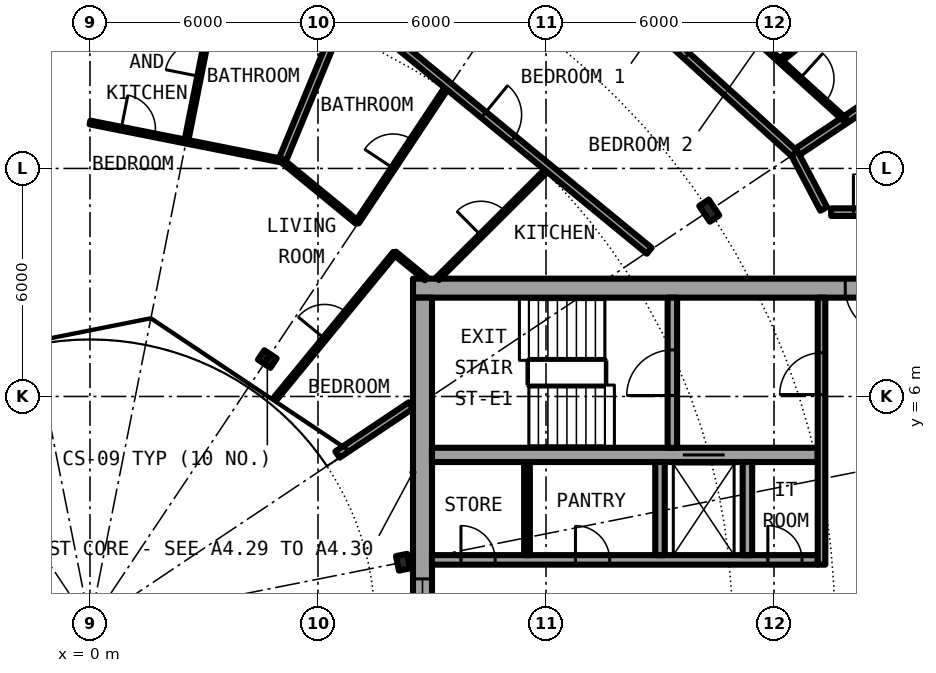
"""IFC4 building model, lengths in metres.
Left out: names, types, materials, properties, quantities, classifications, styles, units other than length and angle.
Written with IfcOpenShell. Run it as: python <this file> out.ifc"""

import sys

from ifc_helpers import new_model, si_unit, direction, frame, frame_2d, origin, origin_2d, place, context, subcontext, project, spatial, rectangle, i_section, extrude, element, fill, save


model = new_model("IFC4")
c1 = context("Model", 3, precision=1e-05, world=origin(), true_north=direction((0.0, 1.0)))
c2 = subcontext(c1, "Body", "Model", "MODEL_VIEW")
j1 = project(units=[si_unit("LENGTHUNIT", "METRE"), si_unit("PLANEANGLEUNIT", "RADIAN")], contexts=[c1])
p1 = place(None, origin())
s1 = spatial("IfcSite", under=j1, at=p1, CompositionType="ELEMENT")
p2 = place(p1, origin())
s2 = spatial("IfcBuilding", under=s1, at=p2, CompositionType="ELEMENT")
p3 = place(p2, frame((0.0, 0.0, 161.6)))
s3 = spatial("IfcBuildingStorey", under=s2, at=p3, CompositionType="ELEMENT", Elevation=161.6)
p4 = place(p3, frame((16.297, 10.889, 0.0), z_axis=(0.0, 0.0, 1.0), x_axis=(0.831469612303, 0.55557023302, 0.0)))
e1 = element("IfcColumn", 1, at=p4, inside=s3, PredefinedType="COLUMN", context=c2, shape_type="SweptSolid", body=[
    extrude(i_section(OverallWidth=0.3, OverallDepth=0.5, WebThickness=0.014, FlangeThickness=0.028, FilletRadius=0.027, at=origin_2d()), origin(), (0.0, 0.0, 1.0), 3.05),
])
for number, where, z_axis, x_axis in (
    (2, (8.239, 1.639, 0.0), (0.0, 0.0, 1.0), (0.981, 0.195, 0.0)),
    (3, (4.667, 6.984, 0.0), (0.0, 0.0, 1.0), (0.556, 0.831, 0.0)),
):
    element("IfcColumn", number, at=place(p3, frame(where, z_axis=z_axis, x_axis=x_axis)), inside=s3, PredefinedType="COLUMN", context=c2, shape_type="SweptSolid", body=[
        extrude(i_section(OverallWidth=0.3, OverallDepth=0.39, WebThickness=0.011, FlangeThickness=0.019, FilletRadius=0.027, at=origin_2d()), origin(), (0.0, 0.0, 1.0), 3.05),
    ])
p5 = place(p3, frame((22.1, 8.85, 0.0), z_axis=(0.0, 0.0, 1.0), x_axis=(-1.0, 0.0, 0.0)))
e4 = element("IfcWall", 4, at=p5, inside=s3, PredefinedType="SHEAR", context=c2, shape_type="SweptSolid", body=[
    extrude(rectangle(XDim=13.6, YDim=0.5, at=frame_2d((6.8, 0.0))), origin(), (0.0, 0.0, 1.0), 3.05),
])
p6 = place(p5, frame((1.025, 0.0, 0.0)))
e5 = element("IfcOpeningElement", 5, at=p6, cuts=e4, PredefinedType="OPENING", context=c2, shape_type="SweptSolid", body=[
    extrude(rectangle(XDim=1.2, YDim=2.3, at=frame_2d((0.6, 1.15))), frame((0.0, 0.26, 0.0), z_axis=(0.0, -1.0, 0.0), x_axis=(1.0, 0.0, 0.0)), (0.0, 0.0, 1.0), 0.52),
])
p7 = place(p3, frame((8.75, -8.6, 0.0), z_axis=(0.0, 0.0, 1.0), x_axis=(0.0, 1.0, 0.0)))
e6 = element("IfcWall", 6, at=p7, inside=s3, PredefinedType="SHEAR", context=c2, shape_type="SweptSolid", body=[
    extrude(rectangle(XDim=17.2, YDim=0.5, at=frame_2d((8.6, 0.0))), origin(), (0.0, 0.0, 1.0), 3.05),
])
p8 = place(p7, frame((7.4, 0.0, 0.1)))
e7 = element("IfcOpeningElement", 7, at=p8, cuts=e6, PredefinedType="OPENING", context=c2, shape_type="SweptSolid", body=[
    extrude(rectangle(XDim=2.4, YDim=2.2, at=frame_2d((1.2, 1.1))), frame((0.0, 0.26, 0.0), z_axis=(0.0, -1.0, 0.0), x_axis=(1.0, 0.0, 0.0)), (0.0, 0.0, 1.0), 0.52),
])
p9 = place(p3, frame((9.0, 1.7, 0.0), z_axis=(0.0, 0.0, 1.0), x_axis=(1.0, 0.0, 0.0)))
e8 = element("IfcWall", 8, at=p9, inside=s3, PredefinedType="SHEAR", context=c2, shape_type="SweptSolid", body=[
    extrude(rectangle(XDim=10.15, YDim=0.25, at=frame_2d((5.075, 0.0))), origin(), (0.0, 0.0, 1.0), 3.05),
])
p10 = place(p9, frame((0.762, 0.0, 0.0)))
e9 = element("IfcOpeningElement", 9, at=p10, cuts=e8, PredefinedType="OPENING", context=c2, shape_type="SweptSolid", body=[
    extrude(rectangle(XDim=0.9, YDim=2.3, at=frame_2d((0.45, 1.15))), frame((0.0, 0.135, 0.0), z_axis=(0.0, -1.0, 0.0), x_axis=(1.0, 0.0, 0.0)), (0.0, 0.0, 1.0), 0.27),
])
p11 = place(p9, frame((3.775, 0.0, 0.0)))
e10 = element("IfcOpeningElement", 10, at=p11, cuts=e8, PredefinedType="OPENING", context=c2, shape_type="SweptSolid", body=[
    extrude(rectangle(XDim=0.9, YDim=2.3, at=frame_2d((0.45, 1.15))), frame((0.0, 0.135, 0.0), z_axis=(0.0, -1.0, 0.0), x_axis=(1.0, 0.0, 0.0)), (0.0, 0.0, 1.0), 0.27),
])
p12 = place(p9, frame((8.837, 0.0, 0.0)))
e11 = element("IfcOpeningElement", 11, at=p12, cuts=e8, PredefinedType="OPENING", context=c2, shape_type="SweptSolid", body=[
    extrude(rectangle(XDim=0.9, YDim=2.3, at=frame_2d((0.45, 1.15))), frame((0.0, 0.135, 0.0), z_axis=(0.0, -1.0, 0.0), x_axis=(1.0, 0.0, 0.0)), (0.0, 0.0, 1.0), 0.27),
])
p13 = place(p3, frame((9.0, 4.462, 0.0), z_axis=(0.0, 0.0, 1.0), x_axis=(1.0, 0.0, 0.0)))
e12 = element("IfcWall", 12, at=p13, inside=s3, PredefinedType="SHEAR", context=c2, shape_type="SweptSolid", body=[
    extrude(rectangle(XDim=10.15, YDim=0.375, at=frame_2d((5.075, 0.0))), origin(), (0.0, 0.0, 1.0), 3.05),
])
p14 = place(p13, frame((6.6, 0.0, 0.0)))
e13 = element("IfcOpeningElement", 13, at=p14, cuts=e12, PredefinedType="OPENING", context=c2, shape_type="SweptSolid", body=[
    extrude(rectangle(XDim=1.1, YDim=2.3, at=frame_2d((0.55, 1.15))), frame((0.0, 0.198, 0.0), z_axis=(0.0, -1.0, 0.0), x_axis=(1.0, 0.0, 0.0)), (0.0, 0.0, 1.0), 0.395),
])
p15 = place(p3, frame((15.325, 4.65, 0.0), z_axis=(0.0, 0.0, 1.0), x_axis=(0.0, 1.0, 0.0)))
e14 = element("IfcWall", 14, at=p15, inside=s3, PredefinedType="SHEAR", context=c2, shape_type="SweptSolid", body=[
    extrude(rectangle(XDim=3.95, YDim=0.25, at=frame_2d((1.975, 0.0))), origin(), (0.0, 0.0, 1.0), 3.05),
])
p16 = place(p15, frame((1.375, 0.0, 0.0)))
e15 = element("IfcOpeningElement", 15, at=p16, cuts=e14, PredefinedType="OPENING", context=c2, shape_type="SweptSolid", body=[
    extrude(rectangle(XDim=1.2, YDim=2.3, at=frame_2d((0.6, 1.15))), frame((0.0, 0.135, 0.0), z_axis=(0.0, -1.0, 0.0), x_axis=(1.0, 0.0, 0.0)), (0.0, 0.0, 1.0), 0.27),
])
for number, where, z_axis, x_axis in (
    (16, (15.0, 1.825, 0.0), (0.0, 0.0, 1.0), (0.0, 1.0, 0.0)),
    (17, (17.3, 1.825, 0.0), (0.0, 0.0, 1.0), (0.0, 1.0, 0.0)),
):
    element("IfcWall", number, at=place(p3, frame(where, z_axis=z_axis, x_axis=x_axis)), inside=s3, PredefinedType="SOLIDWALL", context=c2, shape_type="SweptSolid", body=[
        extrude(rectangle(XDim=2.45, YDim=0.25, at=frame_2d((1.225, 0.0))), origin(), (0.0, 0.0, 1.0), 2.7),
    ])
p17 = place(p3, frame((19.25, 1.575, 0.0), z_axis=(0.0, 0.0, 1.0), x_axis=(0.0, 1.0, 0.0)))
e18 = element("IfcWall", 18, at=p17, inside=s3, PredefinedType="SOLIDWALL", context=c2, shape_type="SweptSolid", body=[
    extrude(rectangle(XDim=7.025, YDim=0.2, at=frame_2d((3.513, 0.0))), origin(), (0.0, 0.0, 1.0), 2.7),
])
p18 = place(p17, frame((4.475, 0.0, 0.0)))
e19 = element("IfcOpeningElement", 19, at=p18, cuts=e18, PredefinedType="OPENING", context=c2, shape_type="SweptSolid", body=[
    extrude(rectangle(XDim=1.1, YDim=2.3, at=frame_2d((0.55, 1.15))), frame((0.0, 0.11, 0.0), z_axis=(0.0, -1.0, 0.0), x_axis=(1.0, 0.0, 0.0)), (0.0, 0.0, 1.0), 0.22),
])
p19 = place(p3, frame((11.5, 1.825, 0.0), z_axis=(0.0, 0.0, 1.0), x_axis=(0.0, 1.0, 0.0)))
e20 = element("IfcWall", 20, at=p19, inside=s3, PredefinedType="PARTITIONING", context=c2, shape_type="SweptSolid", body=[
    extrude(rectangle(XDim=2.45, YDim=0.15, at=frame_2d((1.225, 0.0))), origin(), (0.0, 0.0, 1.0), 2.7),
])
p20 = place(p3, frame((2.532, 12.705, 0.0), z_axis=(0.0, 0.0, 1.0), x_axis=(0.195273978699, 0.980748730941, 0.0)))
e21 = element("IfcWall", 21, at=p20, inside=s3, PredefinedType="PARTITIONING", context=c2, shape_type="SweptSolid", body=[
    extrude(rectangle(XDim=4.405, YDim=0.1, at=frame_2d((2.202, 0.0))), origin(), (0.0, 0.0, 1.0), 2.7),
])
p21 = place(p20, frame((1.752, 0.0, 0.0)))
e22 = element("IfcOpeningElement", 22, at=p21, cuts=e21, PredefinedType="OPENING", context=c2, shape_type="SweptSolid", body=[
    extrude(rectangle(XDim=0.9, YDim=2.3, at=frame_2d((0.45, 1.15))), frame((0.0, 0.06, 0.0), z_axis=(0.0, -1.0, 0.0), x_axis=(1.0, 0.0, 0.0)), (0.0, 0.0, 1.0), 0.12),
])
p22 = place(p3, frame((4.898, 5.968, 0.0), z_axis=(0.0, 0.0, 1.0), x_axis=(0.634401778971, 0.773003481776, 0.0)))
e23 = element("IfcWall", 23, at=p22, inside=s3, PredefinedType="PARTITIONING", context=c2, shape_type="SweptSolid", body=[
    extrude(rectangle(XDim=4.92, YDim=0.1, at=frame_2d((2.46, 0.0))), origin(), (0.0, 0.0, 1.0), 2.7),
])
p23 = place(p22, frame((2.01, 0.0, 0.0)))
e24 = element("IfcOpeningElement", 24, at=p23, cuts=e23, PredefinedType="OPENING", context=c2, shape_type="SweptSolid", body=[
    extrude(rectangle(XDim=0.9, YDim=2.3, at=frame_2d((0.45, 1.15))), frame((0.0, 0.06, 0.0), z_axis=(0.0, -1.0, 0.0), x_axis=(1.0, 0.0, 0.0)), (0.0, 0.0, 1.0), 0.12),
])
p24 = place(p3, frame((5.055, 12.204, 0.0), z_axis=(0.0, 0.0, 1.0), x_axis=(0.38258387732, 0.923920763277, 0.0)))
e25 = element("IfcWall", 25, at=p24, inside=s3, PredefinedType="PARTITIONING", context=c2, shape_type="SweptSolid", body=[
    extrude(rectangle(XDim=4.49, YDim=0.2, at=frame_2d((2.245, 0.0))), origin(), (0.0, 0.0, 1.0), 2.7),
])
p25 = place(p3, frame((7.031, 10.582, 0.0), z_axis=(0.0, 0.0, 1.0), x_axis=(0.553303732327, 0.832979579457, 0.0)))
e26 = element("IfcWall", 26, at=p25, inside=s3, PredefinedType="PARTITIONING", context=c2, shape_type="SweptSolid", body=[
    extrude(rectangle(XDim=4.319, YDim=0.1, at=frame_2d((2.16, 0.0))), origin(), (0.0, 0.0, 1.0), 2.7),
])
p26 = place(p25, frame((1.71, 0.0, 0.0)))
e27 = element("IfcOpeningElement", 27, at=p26, cuts=e26, PredefinedType="OPENING", context=c2, shape_type="SweptSolid", body=[
    extrude(rectangle(XDim=0.9, YDim=2.3, at=frame_2d((0.45, 1.15))), frame((0.0, 0.06, 0.0), z_axis=(0.0, -1.0, 0.0), x_axis=(1.0, 0.0, 0.0)), (0.0, 0.0, 1.0), 0.12),
])
p27 = place(p3, frame((9.148, 9.1, 0.0), z_axis=(0.0, 0.0, 1.0), x_axis=(0.708822693149, 0.705386695138, 0.0)))
e28 = element("IfcWall", 28, at=p27, inside=s3, PredefinedType="PARTITIONING", context=c2, shape_type="SweptSolid", body=[
    extrude(rectangle(XDim=4.121, YDim=0.1, at=frame_2d((2.061, 0.0))), origin(), (0.0, 0.0, 1.0), 2.7),
])
p28 = place(p27, frame((1.611, 0.0, 0.0)))
e29 = element("IfcOpeningElement", 29, at=p28, cuts=e28, PredefinedType="OPENING", context=c2, shape_type="SweptSolid", body=[
    extrude(rectangle(XDim=0.9, YDim=2.3, at=frame_2d((0.45, 1.15))), frame((0.0, 0.06, 0.0), z_axis=(0.0, -1.0, 0.0), x_axis=(1.0, 0.0, 0.0)), (0.0, 0.0, 1.0), 0.12),
])
p29 = place(p3, frame((18.154, 14.834, 0.0), z_axis=(0.0, 0.0, 1.0), x_axis=(0.77429537896, 0.632824356454, 0.0)))
e30 = element("IfcWall", 30, at=p29, inside=s3, PredefinedType="PARTITIONING", context=c2, shape_type="SweptSolid", body=[
    extrude(rectangle(XDim=3.731, YDim=0.1, at=frame_2d((1.865, 0.0))), origin(), (0.0, 0.0, 1.0), 2.7),
])
p30 = place(p3, frame((18.542, 12.389, 0.0), z_axis=(0.0, 0.0, 1.0), x_axis=(0.831387096605, 0.55569370664, 0.0)))
e31 = element("IfcWall", 31, at=p30, inside=s3, PredefinedType="PARTITIONING", context=c2, shape_type="SweptSolid", body=[
    extrude(rectangle(XDim=4.875, YDim=0.2, at=frame_2d((2.438, 0.0))), origin(), (0.0, 0.0, 1.0), 2.7),
])
p31 = place(p3, frame((6.513, 4.472, 0.0), z_axis=(0.0, 0.0, 1.0), x_axis=(0.83133816625, 0.555766905579, 0.0)))
e32 = element("IfcWall", 32, at=p31, inside=s3, PredefinedType="PARTITIONING", context=c2, shape_type="SweptSolid", body=[
    extrude(rectangle(XDim=2.323, YDim=0.2, at=frame_2d((1.162, 0.0))), origin(), (0.0, 0.0, 1.0), 2.7),
])
p32 = place(p3, frame((19.504, 10.85, 0.0), z_axis=(0.0, 0.0, 1.0), x_axis=(1.0, 0.0, 0.0)))
e33 = element("IfcWall", 33, at=p32, inside=s3, PredefinedType="PARTITIONING", context=c2, shape_type="SweptSolid", body=[
    extrude(rectangle(XDim=2.171, YDim=0.2, at=frame_2d((1.085, 0.0))), origin(), (0.0, 0.0, 1.0), 2.7),
])
p33 = place(p32, frame((0.585, 0.0, 0.0)))
e34 = element("IfcOpeningElement", 34, at=p33, cuts=e33, PredefinedType="OPENING", context=c2, shape_type="SweptSolid", body=[
    extrude(rectangle(XDim=1.0, YDim=2.3, at=frame_2d((0.5, 1.15))), frame((0.0, 0.11, 0.0), z_axis=(0.0, -1.0, 0.0), x_axis=(1.0, 0.0, 0.0)), (0.0, 0.0, 1.0), 0.22),
])
p34 = place(p3, frame((5.058, 12.203, 0.0), z_axis=(0.0, 0.0, 1.0), x_axis=(0.772764723682, -0.634692588449, 0.0)))
e35 = element("IfcWall", 35, at=p34, inside=s3, PredefinedType="PARTITIONING", context=c2, shape_type="SweptSolid", body=[
    extrude(rectangle(XDim=2.557, YDim=0.1, at=frame_2d((1.278, 0.0))), origin(), (0.0, 0.0, 1.0), 2.7),
])
p35 = place(p3, frame((8.019, 9.771, 0.0), z_axis=(0.0, 0.0, 1.0), x_axis=(0.772730269942, -0.634734534995, 0.0)))
e36 = element("IfcWall", 36, at=p35, inside=s3, PredefinedType="PARTITIONING", context=c2, shape_type="SweptSolid", body=[
    extrude(rectangle(XDim=1.065, YDim=0.1, at=frame_2d((0.532, 0.0))), origin(), (0.0, 0.0, 1.0), 2.7),
])
p36 = place(p3, frame((0.0, 13.209, 0.0), z_axis=(0.0, 0.0, 1.0), x_axis=(0.980766092797, -0.195186759846, 0.0)))
e37 = element("IfcWall", 37, at=p36, inside=s3, PredefinedType="PARTITIONING", context=c2, shape_type="SweptSolid", body=[
    extrude(rectangle(XDim=2.577, YDim=0.1, at=frame_2d((1.288, 0.0))), origin(), (0.0, 0.0, 1.0), 2.7),
])
p37 = place(p36, frame((0.838, 0.0, 0.0)))
e38 = element("IfcOpeningElement", 38, at=p37, cuts=e37, PredefinedType="OPENING", context=c2, shape_type="SweptSolid", body=[
    extrude(rectangle(XDim=0.9, YDim=2.3, at=frame_2d((0.45, 1.15))), frame((0.0, 0.06, 0.0), z_axis=(0.0, -1.0, 0.0), x_axis=(1.0, 0.0, 0.0)), (0.0, 0.0, 1.0), 0.12),
])
p38 = place(p3, frame((6.773, 16.353, 0.0), z_axis=(0.0, 0.0, 1.0), x_axis=(0.773034536097, -0.634363938131, 0.0)))
e39 = element("IfcWall", 39, at=p38, inside=s3, PredefinedType="PARTITIONING", context=c2, shape_type="SweptSolid", body=[
    extrude(rectangle(XDim=10.277, YDim=0.2, at=frame_2d((5.138, 0.0))), origin(), (0.0, 0.0, 1.0), 2.7),
])
p39 = place(p38, frame((4.638, 0.0, 0.0)))
e40 = element("IfcOpeningElement", 40, at=p39, cuts=e39, PredefinedType="OPENING", context=c2, shape_type="SweptSolid", body=[
    extrude(rectangle(XDim=1.0, YDim=2.3, at=frame_2d((0.5, 1.15))), frame((0.0, 0.11, 0.0), z_axis=(0.0, -1.0, 0.0), x_axis=(1.0, 0.0, 0.0)), (0.0, 0.0, 1.0), 0.22),
])
p40 = place(p3, frame((10.512, 19.667, 0.0), z_axis=(0.0, 0.0, 1.0), x_axis=(0.740849323054, -0.67167125927, 0.0)))
e41 = element("IfcWall", 41, at=p40, inside=s3, PredefinedType="PARTITIONING", context=c2, shape_type="SweptSolid", body=[
    extrude(rectangle(XDim=10.842, YDim=0.2, at=frame_2d((5.421, 0.0))), origin(), (0.0, 0.0, 1.0), 2.7),
])
p41 = place(p40, frame((6.003, 0.0, 0.0)))
e42 = element("IfcOpeningElement", 42, at=p41, cuts=e41, PredefinedType="OPENING", context=c2, shape_type="SweptSolid", body=[
    extrude(rectangle(XDim=1.0, YDim=2.3, at=frame_2d((0.5, 1.15))), frame((0.0, 0.11, 0.0), z_axis=(0.0, -1.0, 0.0), x_axis=(1.0, 0.0, 0.0)), (0.0, 0.0, 1.0), 0.22),
])
p42 = place(p3, frame((18.542, 12.389, 0.0), z_axis=(0.0, 0.0, 1.0), x_axis=(0.465605550524, -0.884992356646, 0.0)))
e43 = element("IfcWall", 43, at=p42, inside=s3, PredefinedType="PARTITIONING", context=c2, shape_type="SweptSolid", body=[
    extrude(rectangle(XDim=1.643, YDim=0.2, at=frame_2d((0.821, 0.0))), origin(), (0.0, 0.0, 1.0), 2.7),
])
p43 = place(p3, frame((14.709, 17.958, 0.0), z_axis=(0.0, 0.0, 1.0), x_axis=(0.740923753351, -0.671589153962, 0.0)))
e44 = element("IfcWall", 44, at=p43, inside=s3, PredefinedType="PARTITIONING", context=c2, shape_type="SweptSolid", body=[
    extrude(rectangle(XDim=6.969, YDim=0.1, at=frame_2d((3.484, 0.0))), origin(), (0.0, 0.0, 1.0), 2.7),
])
p44 = place(p43, frame((3.034, 0.0, 0.0)))
e45 = element("IfcOpeningElement", 45, at=p44, cuts=e44, PredefinedType="OPENING", context=c2, shape_type="SweptSolid", body=[
    extrude(rectangle(XDim=0.9, YDim=2.3, at=frame_2d((0.45, 1.15))), frame((0.0, 0.06, 0.0), z_axis=(0.0, -1.0, 0.0), x_axis=(1.0, 0.0, 0.0)), (0.0, 0.0, 1.0), 0.12),
])
p45 = place(p43, frame((5.357, 0.0, 0.0)))
e46 = element("IfcOpeningElement", 46, at=p45, cuts=e44, PredefinedType="OPENING", context=c2, shape_type="SweptSolid", body=[
    extrude(rectangle(XDim=0.9, YDim=2.3, at=frame_2d((0.45, 1.15))), frame((0.0, 0.06, 0.0), z_axis=(0.0, -1.0, 0.0), x_axis=(1.0, 0.0, 0.0)), (0.0, 0.0, 1.0), 0.12),
])
p46 = place(p3, frame((5.035, 12.208, 0.0), z_axis=(0.0, 0.0, 1.0), x_axis=(-0.980857356895, 0.194727618547, 0.0)))
e47 = element("IfcWall", 47, at=p46, inside=s3, PredefinedType="PARTITIONING", context=c2, shape_type="SweptSolid", body=[
    extrude(rectangle(XDim=2.536, YDim=0.1, at=frame_2d((1.268, 0.0))), origin(), (0.0, 0.0, 1.0), 2.7),
])
p47 = place(p14, origin())
e48 = element("IfcDoor", 48, at=p47, inside=s3, OperationType="DOUBLE_DOOR_SLIDING", PredefinedType="DOOR", context=c2, shape_type="SweptSolid", body=[
    extrude(rectangle(XDim=1.1, YDim=2.3, at=frame_2d((0.55, 1.15))), frame((0.0, 0.025, 0.0), z_axis=(0.0, -1.0, 0.0), x_axis=(1.0, 0.0, 0.0)), (0.0, 0.0, 1.0), 0.05),
])
fill(e13, e48)
p48 = place(p10, origin())
e49 = element("IfcDoor", 49, at=p48, inside=s3, OperationType="SINGLE_SWING_RIGHT", PredefinedType="DOOR", context=c2, shape_type="SweptSolid", body=[
    extrude(rectangle(XDim=0.9, YDim=2.3, at=frame_2d((0.45, 1.15))), frame((0.0, 0.025, 0.0), z_axis=(0.0, -1.0, 0.0), x_axis=(1.0, 0.0, 0.0)), (0.0, 0.0, 1.0), 0.05),
])
fill(e9, e49)
p49 = place(p11, origin())
e50 = element("IfcDoor", 50, at=p49, inside=s3, OperationType="SINGLE_SWING_RIGHT", PredefinedType="DOOR", context=c2, shape_type="SweptSolid", body=[
    extrude(rectangle(XDim=0.9, YDim=2.3, at=frame_2d((0.45, 1.15))), frame((0.0, 0.025, 0.0), z_axis=(0.0, -1.0, 0.0), x_axis=(1.0, 0.0, 0.0)), (0.0, 0.0, 1.0), 0.05),
])
fill(e10, e50)
p50 = place(p12, origin())
e51 = element("IfcDoor", 51, at=p50, inside=s3, OperationType="SINGLE_SWING_LEFT", PredefinedType="DOOR", context=c2, shape_type="SweptSolid", body=[
    extrude(rectangle(XDim=0.9, YDim=2.3, at=frame_2d((0.45, 1.15))), frame((0.0, 0.025, 0.0), z_axis=(0.0, -1.0, 0.0), x_axis=(1.0, 0.0, 0.0)), (0.0, 0.0, 1.0), 0.05),
])
fill(e11, e51)
p51 = place(p16, origin())
e52 = element("IfcDoor", 52, at=p51, inside=s3, OperationType="SINGLE_SWING_LEFT", PredefinedType="DOOR", context=c2, shape_type="SweptSolid", body=[
    extrude(rectangle(XDim=1.2, YDim=2.3, at=frame_2d((0.6, 1.15))), frame((0.0, 0.025, 0.0), z_axis=(0.0, -1.0, 0.0), x_axis=(1.0, 0.0, 0.0)), (0.0, 0.0, 1.0), 0.05),
])
fill(e15, e52)
p52 = place(p18, origin())
e53 = element("IfcDoor", 53, at=p52, inside=s3, OperationType="SINGLE_SWING_LEFT", PredefinedType="DOOR", context=c2, shape_type="SweptSolid", body=[
    extrude(rectangle(XDim=1.1, YDim=2.3, at=frame_2d((0.55, 1.15))), frame((0.0, 0.025, 0.0), z_axis=(0.0, -1.0, 0.0), x_axis=(1.0, 0.0, 0.0)), (0.0, 0.0, 1.0), 0.05),
])
fill(e19, e53)
p53 = place(p6, origin())
e54 = element("IfcDoor", 54, at=p53, inside=s3, OperationType="SINGLE_SWING_RIGHT", PredefinedType="DOOR", context=c2, shape_type="SweptSolid", body=[
    extrude(rectangle(XDim=1.2, YDim=2.3, at=frame_2d((0.6, 1.15))), frame((0.0, 0.025, 0.0), z_axis=(0.0, -1.0, 0.0), x_axis=(1.0, 0.0, 0.0)), (0.0, 0.0, 1.0), 0.05),
])
fill(e5, e54)
p54 = place(p8, origin())
e55 = element("IfcWindow", 55, at=p54, inside=s3, PartitioningType="SINGLE_PANEL", PredefinedType="WINDOW", context=c2, shape_type="SweptSolid", body=[
    extrude(rectangle(XDim=2.4, YDim=2.2, at=frame_2d((1.2, 1.1))), frame((0.0, 0.03, 0.0), z_axis=(0.0, -1.0, 0.0), x_axis=(1.0, 0.0, 0.0)), (0.0, 0.0, 1.0), 0.06),
])
fill(e7, e55)
p55 = place(p41, origin())
e56 = element("IfcDoor", 56, at=p55, inside=s3, OperationType="SINGLE_SWING_RIGHT", PredefinedType="DOOR", context=c2, shape_type="SweptSolid", body=[
    extrude(rectangle(XDim=1.0, YDim=2.3, at=frame_2d((0.5, 1.15))), frame((0.0, 0.025, 0.0), z_axis=(0.0, -1.0, 0.0), x_axis=(1.0, 0.0, 0.0)), (0.0, 0.0, 1.0), 0.05),
])
fill(e42, e56)
p56 = place(p45, origin())
e57 = element("IfcDoor", 57, at=p56, inside=s3, OperationType="SINGLE_SWING_RIGHT", PredefinedType="DOOR", context=c2, shape_type="SweptSolid", body=[
    extrude(rectangle(XDim=0.9, YDim=2.3, at=frame_2d((0.45, 1.15))), frame((0.0, 0.025, 0.0), z_axis=(0.0, -1.0, 0.0), x_axis=(1.0, 0.0, 0.0)), (0.0, 0.0, 1.0), 0.05),
])
fill(e46, e57)
p57 = place(p39, origin())
e58 = element("IfcDoor", 58, at=p57, inside=s3, OperationType="SINGLE_SWING_RIGHT", PredefinedType="DOOR", context=c2, shape_type="SweptSolid", body=[
    extrude(rectangle(XDim=1.0, YDim=2.3, at=frame_2d((0.5, 1.15))), frame((0.0, 0.025, 0.0), z_axis=(0.0, -1.0, 0.0), x_axis=(1.0, 0.0, 0.0)), (0.0, 0.0, 1.0), 0.05),
])
fill(e40, e58)
p58 = place(p26, origin())
e59 = element("IfcDoor", 59, at=p58, inside=s3, OperationType="SINGLE_SWING_LEFT", PredefinedType="DOOR", context=c2, shape_type="SweptSolid", body=[
    extrude(rectangle(XDim=0.9, YDim=2.3, at=frame_2d((0.45, 1.15))), frame((0.0, 0.025, 0.0), z_axis=(0.0, -1.0, 0.0), x_axis=(1.0, 0.0, 0.0)), (0.0, 0.0, 1.0), 0.05),
])
fill(e27, e59)
p59 = place(p28, origin())
e60 = element("IfcDoor", 60, at=p59, inside=s3, OperationType="SINGLE_SWING_LEFT", PredefinedType="DOOR", context=c2, shape_type="SweptSolid", body=[
    extrude(rectangle(XDim=0.9, YDim=2.3, at=frame_2d((0.45, 1.15))), frame((0.0, 0.025, 0.0), z_axis=(0.0, -1.0, 0.0), x_axis=(1.0, 0.0, 0.0)), (0.0, 0.0, 1.0), 0.05),
])
fill(e29, e60)
p60 = place(p23, origin())
e61 = element("IfcDoor", 61, at=p60, inside=s3, OperationType="SINGLE_SWING_RIGHT", PredefinedType="DOOR", context=c2, shape_type="SweptSolid", body=[
    extrude(rectangle(XDim=0.9, YDim=2.3, at=frame_2d((0.45, 1.15))), frame((0.0, 0.025, 0.0), z_axis=(0.0, -1.0, 0.0), x_axis=(1.0, 0.0, 0.0)), (0.0, 0.0, 1.0), 0.05),
])
fill(e24, e61)
p61 = place(p21, origin())
e62 = element("IfcDoor", 62, at=p61, inside=s3, OperationType="SINGLE_SWING_RIGHT", PredefinedType="DOOR", context=c2, shape_type="SweptSolid", body=[
    extrude(rectangle(XDim=0.9, YDim=2.3, at=frame_2d((0.45, 1.15))), frame((0.0, 0.025, 0.0), z_axis=(0.0, -1.0, 0.0), x_axis=(1.0, 0.0, 0.0)), (0.0, 0.0, 1.0), 0.05),
])
fill(e22, e62)
p62 = place(p37, origin())
e63 = element("IfcDoor", 63, at=p62, inside=s3, OperationType="SINGLE_SWING_LEFT", PredefinedType="DOOR", context=c2, shape_type="SweptSolid", body=[
    extrude(rectangle(XDim=0.9, YDim=2.3, at=frame_2d((0.45, 1.15))), frame((0.0, 0.025, 0.0), z_axis=(0.0, -1.0, 0.0), x_axis=(1.0, 0.0, 0.0)), (0.0, 0.0, 1.0), 0.05),
])
fill(e38, e63)
p63 = place(p33, origin())
e64 = element("IfcDoor", 64, at=p63, inside=s3, OperationType="SINGLE_SWING_LEFT", PredefinedType="DOOR", context=c2, shape_type="SweptSolid", body=[
    extrude(rectangle(XDim=1.0, YDim=2.3, at=frame_2d((0.5, 1.15))), frame((0.0, 0.025, 0.0), z_axis=(0.0, -1.0, 0.0), x_axis=(1.0, 0.0, 0.0)), (0.0, 0.0, 1.0), 0.05),
])
fill(e34, e64)
save(model, sys.argv[1])
